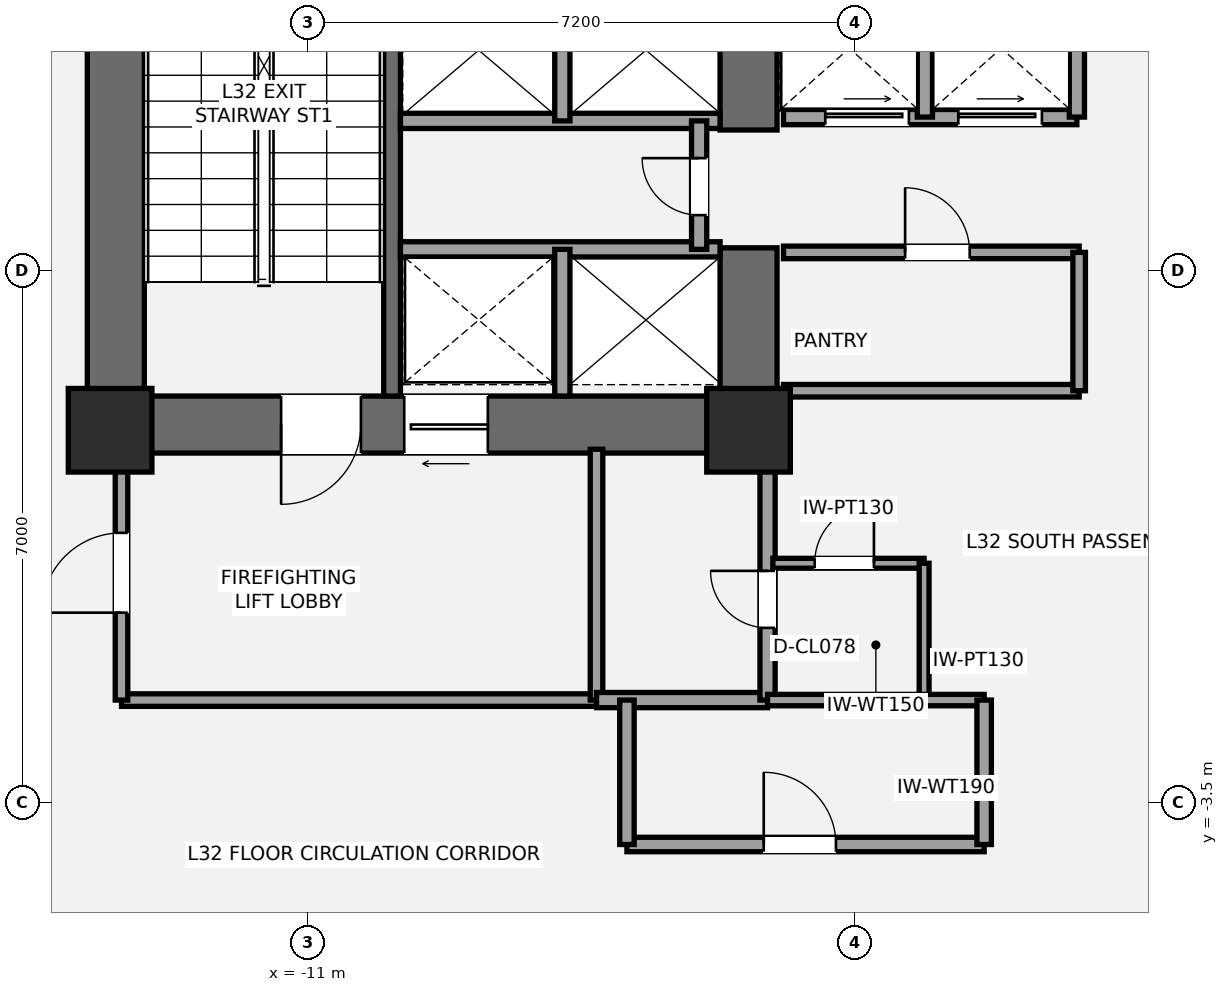
"""IFC4 building model, lengths in metres.
Left out: names, types, materials, properties, quantities, classifications, styles, units other than length and angle.
Written with IfcOpenShell. Run it as: python <this file> out.ifc"""

import sys

from ifc_helpers import new_model, si_unit, direction, frame, frame_2d, origin, origin_2d, place, context, subcontext, project, spatial, rectangle, extrude, element, fill, save


model = new_model("IFC4")
c1 = context("Model", 3, precision=1e-05, world=origin(), true_north=direction((0.0, 1.0)))
c2 = subcontext(c1, "Body", "Model", "MODEL_VIEW")
j1 = project(units=[si_unit("LENGTHUNIT", "METRE"), si_unit("PLANEANGLEUNIT", "RADIAN")], contexts=[c1])
p1 = place(None, origin())
s1 = spatial("IfcSite", under=j1, at=p1, CompositionType="ELEMENT")
p2 = place(p1, origin())
s2 = spatial("IfcBuilding", under=s1, at=p2, CompositionType="ELEMENT")
p3 = place(p2, frame((0.0, 0.0, 121.1)))
s3 = spatial("IfcBuildingStorey", under=s2, at=p3, CompositionType="ELEMENT", Elevation=121.1)
p4 = place(p3, frame((-13.525, 1.1, 0.0), z_axis=(0.0, 0.0, 1.0), x_axis=(0.0, 1.0, 0.0)))
e1 = element("IfcWall", 1, at=p4, inside=s3, PredefinedType="SHEAR", context=c2, shape_type="SweptSolid", body=[
    extrude(rectangle(XDim=8.65, YDim=0.75, at=frame_2d((4.325, 0.0))), origin(), (0.0, 0.0, 1.0), 3.5),
])
p5 = place(p3, frame((-4.825, 1.475, 0.0), z_axis=(0.0, 0.0, 1.0), x_axis=(-1.0, 0.0, 0.0)))
e2 = element("IfcWall", 2, at=p5, inside=s3, PredefinedType="SHEAR", context=c2, shape_type="SweptSolid", body=[
    extrude(rectangle(XDim=9.075, YDim=0.75, at=frame_2d((4.538, 0.0))), origin(), (0.0, 0.0, 1.0), 3.5),
])
p6 = place(p5, frame((5.475, 0.0, 0.0)))
e3 = element("IfcOpeningElement", 3, at=p6, cuts=e2, PredefinedType="OPENING", context=c2, shape_type="SweptSolid", body=[
    extrude(rectangle(XDim=1.05, YDim=2.15, at=frame_2d((0.525, 1.075))), frame((0.0, 0.385, 0.0), z_axis=(0.0, -1.0, 0.0), x_axis=(1.0, 0.0, 0.0)), (0.0, 0.0, 1.0), 0.77),
])
p7 = place(p5, frame((3.805, 0.0, 0.0)))
e4 = element("IfcOpeningElement", 4, at=p7, cuts=e2, PredefinedType="OPENING", context=c2, shape_type="SweptSolid", body=[
    extrude(rectangle(XDim=1.1, YDim=2.2, at=frame_2d((0.55, 1.1))), frame((0.0, 0.385, 0.0), z_axis=(0.0, -1.0, 0.0), x_axis=(1.0, 0.0, 0.0)), (0.0, 0.0, 1.0), 0.77),
])
p8 = place(p3, frame((-5.2, 1.1, 0.0), z_axis=(0.0, 0.0, 1.0), x_axis=(0.0, 1.0, 0.0)))
e5 = element("IfcWall", 5, at=p8, inside=s3, PredefinedType="SHEAR", context=c2, shape_type="SweptSolid", body=[
    extrude(rectangle(XDim=2.7, YDim=0.75, at=frame_2d((1.35, 0.0))), origin(), (0.0, 0.0, 1.0), 3.5),
])
p9 = place(p3, frame((-5.2, 5.35, 0.0), z_axis=(0.0, 0.0, 1.0), x_axis=(0.0, 1.0, 0.0)))
e6 = element("IfcWall", 6, at=p9, inside=s3, PredefinedType="SHEAR", context=c2, shape_type="SweptSolid", body=[
    extrude(rectangle(XDim=2.0, YDim=0.75, at=frame_2d((1.0, 0.0))), origin(), (0.0, 0.0, 1.0), 3.5),
])
p10 = place(p3, frame((-9.89, 1.85, 0.0), z_axis=(0.0, 0.0, 1.0), x_axis=(0.0, 1.0, 0.0)))
e7 = element("IfcWall", 7, at=p10, inside=s3, PredefinedType="SHEAR", context=c2, shape_type="SweptSolid", body=[
    extrude(rectangle(XDim=7.15, YDim=0.22, at=frame_2d((3.575, 0.0))), origin(), (0.0, 0.0, 1.0), 3.5),
])
for number, where, z_axis, x_axis in (
    (8, (-13.6, 1.4, 0.0), (0.0, 0.0, 1.0), (1.0, 0.0, 0.0)),
    (9, (-5.2, 1.4, 0.0), (0.0, 0.0, 1.0), (1.0, 0.0, 0.0)),
):
    element("IfcColumn", number, at=place(p3, frame(where, z_axis=z_axis, x_axis=x_axis)), inside=s3, PredefinedType="COLUMN", context=c2, shape_type="SweptSolid", body=[
        extrude(rectangle(XDim=1.1, YDim=1.1, at=origin_2d()), origin(), (0.0, 0.0, 1.0), 3.5),
    ])
p11 = place(p3, frame((-13.45, -2.15, 0.0), z_axis=(0.0, 0.0, 1.0), x_axis=(1.0, 0.0, 0.0)))
e10 = element("IfcWall", 10, at=p11, inside=s3, PredefinedType="PARTITIONING", context=c2, shape_type="SweptSolid", body=[
    extrude(rectangle(XDim=6.25, YDim=0.165, at=frame_2d((3.125, 0.0))), origin(), (0.0, 0.0, 1.0), 3.31),
])
p12 = place(p3, frame((-13.45, -2.15, 0.0), z_axis=(0.0, 0.0, 1.0), x_axis=(0.0, 1.0, 0.0)))
e11 = element("IfcWall", 11, at=p12, inside=s3, PredefinedType="PARTITIONING", context=c2, shape_type="SweptSolid", body=[
    extrude(rectangle(XDim=3.3, YDim=0.165, at=frame_2d((1.65, 0.0))), origin(), (0.0, 0.0, 1.0), 2.763),
])
p13 = place(p12, frame((1.15, 0.0, 0.0)))
e12 = element("IfcOpeningElement", 12, at=p13, cuts=e11, PredefinedType="OPENING", context=c2, shape_type="SweptSolid", body=[
    extrude(rectangle(XDim=1.05, YDim=2.15, at=frame_2d((0.525, 1.075))), frame((0.0, 0.093, 0.0), z_axis=(0.0, -1.0, 0.0), x_axis=(1.0, 0.0, 0.0)), (0.0, 0.0, 1.0), 0.185),
])
p14 = place(p3, frame((-7.2, -2.15, 0.0), z_axis=(0.0, 0.0, 1.0), x_axis=(0.0, 1.0, 0.0)))
e13 = element("IfcWall", 13, at=p14, inside=s3, PredefinedType="PARTITIONING", context=c2, shape_type="SweptSolid", body=[
    extrude(rectangle(XDim=3.3, YDim=0.165, at=frame_2d((1.65, 0.0))), origin(), (0.0, 0.0, 1.0), 2.763),
])
p15 = place(p3, frame((-7.2, -2.15, 0.0), z_axis=(0.0, 0.0, 1.0), x_axis=(1.0, 0.0, 0.0)))
e14 = element("IfcWall", 14, at=p15, inside=s3, PredefinedType="SOLIDWALL", context=c2, shape_type="SweptSolid", body=[
    extrude(rectangle(XDim=2.25, YDim=0.2, at=frame_2d((1.125, 0.0))), origin(), (0.0, 0.0, 1.0), 2.763),
])
p16 = place(p3, frame((-4.95, -2.15, 0.0), z_axis=(0.0, 0.0, 1.0), x_axis=(0.0, 1.0, 0.0)))
e15 = element("IfcWall", 15, at=p16, inside=s3, PredefinedType="SOLIDWALL", context=c2, shape_type="SweptSolid", body=[
    extrude(rectangle(XDim=3.3, YDim=0.2, at=frame_2d((1.65, 0.0))), origin(), (0.0, 0.0, 1.0), 2.763),
])
p17 = place(p16, frame((0.95, 0.0, 0.0)))
e16 = element("IfcOpeningElement", 16, at=p17, cuts=e15, PredefinedType="OPENING", context=c2, shape_type="SweptSolid", body=[
    extrude(rectangle(XDim=0.75, YDim=2.1, at=frame_2d((0.375, 1.05))), frame((0.0, 0.11, 0.0), z_axis=(0.0, -1.0, 0.0), x_axis=(1.0, 0.0, 0.0)), (0.0, 0.0, 1.0), 0.22),
])
p18 = place(p3, frame((-4.88, -0.35, 0.0), z_axis=(0.0, 0.0, 1.0), x_axis=(1.0, 0.0, 0.0)))
e17 = element("IfcWall", 17, at=p18, inside=s3, PredefinedType="PARTITIONING", context=c2, shape_type="SweptSolid", body=[
    extrude(rectangle(XDim=1.99, YDim=0.13, at=frame_2d((0.995, 0.0))), origin(), (0.0, 0.0, 1.0), 3.31),
])
p19 = place(p18, frame((0.55, 0.0, 0.0)))
e18 = element("IfcOpeningElement", 18, at=p19, cuts=e17, PredefinedType="OPENING", context=c2, shape_type="SweptSolid", body=[
    extrude(rectangle(XDim=0.78, YDim=2.1, at=frame_2d((0.39, 1.05))), frame((0.0, 0.075, 0.0), z_axis=(0.0, -1.0, 0.0), x_axis=(1.0, 0.0, 0.0)), (0.0, 0.0, 1.0), 0.15),
])
p20 = place(p3, frame((-2.89, -2.15, 0.0), z_axis=(0.0, 0.0, 1.0), x_axis=(0.0, 1.0, 0.0)))
e19 = element("IfcWall", 19, at=p20, inside=s3, PredefinedType="PARTITIONING", context=c2, shape_type="SweptSolid", body=[
    extrude(rectangle(XDim=1.8, YDim=0.13, at=frame_2d((0.9, 0.0))), origin(), (0.0, 0.0, 1.0), 2.763),
])
p21 = place(p3, frame((-9.78, 3.78, 0.0), z_axis=(0.0, 0.0, 1.0), x_axis=(1.0, 0.0, 0.0)))
e20 = element("IfcWall", 20, at=p21, inside=s3, PredefinedType="SOLIDWALL", context=c2, shape_type="SweptSolid", body=[
    extrude(rectangle(XDim=4.205, YDim=0.2, at=frame_2d((2.103, 0.0))), origin(), (0.0, 0.0, 1.0), 3.31),
])
p22 = place(p3, frame((-7.65, 1.85, 0.0), z_axis=(0.0, 0.0, 1.0), x_axis=(0.0, 1.0, 0.0)))
e21 = element("IfcWall", 21, at=p22, inside=s3, PredefinedType="SOLIDWALL", context=c2, shape_type="SweptSolid", body=[
    extrude(rectangle(XDim=1.93, YDim=0.2, at=frame_2d((0.965, 0.0))), origin(), (0.0, 0.0, 1.0), 3.31),
])
p23 = place(p3, frame((-9.78, 5.47, 0.0), z_axis=(0.0, 0.0, 1.0), x_axis=(1.0, 0.0, 0.0)))
e22 = element("IfcWall", 22, at=p23, inside=s3, PredefinedType="SOLIDWALL", context=c2, shape_type="SweptSolid", body=[
    extrude(rectangle(XDim=4.205, YDim=0.2, at=frame_2d((2.103, 0.0))), origin(), (0.0, 0.0, 1.0), 3.31),
])
p24 = place(p3, frame((-7.65, 5.47, 0.0), z_axis=(0.0, 0.0, 1.0), x_axis=(0.0, 1.0, 0.0)))
e23 = element("IfcWall", 23, at=p24, inside=s3, PredefinedType="SOLIDWALL", context=c2, shape_type="SweptSolid", body=[
    extrude(rectangle(XDim=1.86, YDim=0.2, at=frame_2d((0.93, 0.0))), origin(), (0.0, 0.0, 1.0), 3.31),
])
p25 = place(p3, frame((-5.85, 3.78, 0.0), z_axis=(0.0, 0.0, 1.0), x_axis=(0.0, 1.0, 0.0)))
e24 = element("IfcWall", 24, at=p25, inside=s3, PredefinedType="SOLIDWALL", context=c2, shape_type="SweptSolid", body=[
    extrude(rectangle(XDim=1.69, YDim=0.2, at=frame_2d((0.845, 0.0))), origin(), (0.0, 0.0, 1.0), 3.31),
])
p26 = place(p25, frame((0.45, 0.0, 0.0)))
e25 = element("IfcOpeningElement", 25, at=p26, cuts=e24, PredefinedType="OPENING", context=c2, shape_type="SweptSolid", body=[
    extrude(rectangle(XDim=0.75, YDim=2.1, at=frame_2d((0.375, 1.05))), frame((0.0, 0.11, 0.0), z_axis=(0.0, -1.0, 0.0), x_axis=(1.0, 0.0, 0.0)), (0.0, 0.0, 1.0), 0.22),
])
p27 = place(p3, frame((-4.74, 1.92, 0.0), z_axis=(0.0, 0.0, 1.0), x_axis=(1.0, 0.0, 0.0)))
e26 = element("IfcWall", 26, at=p27, inside=s3, PredefinedType="PARTITIONING", context=c2, shape_type="SweptSolid", body=[
    extrude(rectangle(XDim=3.89, YDim=0.165, at=frame_2d((1.945, 0.0))), origin(), (0.0, 0.0, 1.0), 2.3),
])
p28 = place(p3, frame((-4.74, 3.74, 0.0), z_axis=(0.0, 0.0, 1.0), x_axis=(1.0, 0.0, 0.0)))
e27 = element("IfcWall", 27, at=p28, inside=s3, PredefinedType="PARTITIONING", context=c2, shape_type="SweptSolid", body=[
    extrude(rectangle(XDim=3.89, YDim=0.165, at=frame_2d((1.945, 0.0))), origin(), (0.0, 0.0, 1.0), 3.31),
])
p29 = place(p28, frame((1.6, 0.0, 0.0)))
e28 = element("IfcOpeningElement", 28, at=p29, cuts=e27, PredefinedType="OPENING", context=c2, shape_type="SweptSolid", body=[
    extrude(rectangle(XDim=0.85, YDim=2.1, at=frame_2d((0.425, 1.05))), frame((0.0, 0.093, 0.0), z_axis=(0.0, -1.0, 0.0), x_axis=(1.0, 0.0, 0.0)), (0.0, 0.0, 1.0), 0.185),
])
p30 = place(p3, frame((-0.85, 1.92, 0.0), z_axis=(0.0, 0.0, 1.0), x_axis=(0.0, 1.0, 0.0)))
e29 = element("IfcWall", 29, at=p30, inside=s3, PredefinedType="PARTITIONING", context=c2, shape_type="SweptSolid", body=[
    extrude(rectangle(XDim=1.82, YDim=0.165, at=frame_2d((0.91, 0.0))), origin(), (0.0, 0.0, 1.0), 3.31),
])
p31 = place(p3, frame((-4.74, 5.52, 0.0), z_axis=(0.0, 0.0, 1.0), x_axis=(1.0, 0.0, 0.0)))
e30 = element("IfcWall", 30, at=p31, inside=s3, PredefinedType="SOLIDWALL", context=c2, shape_type="SweptSolid", body=[
    extrude(rectangle(XDim=3.86, YDim=0.2, at=frame_2d((1.93, 0.0))), origin(), (0.0, 0.0, 1.0), 3.31),
])
p32 = place(p31, frame((0.55, 0.0, 0.0)))
e31 = element("IfcOpeningElement", 31, at=p32, cuts=e30, PredefinedType="OPENING", context=c2, shape_type="SweptSolid", body=[
    extrude(rectangle(XDim=1.1, YDim=2.2, at=frame_2d((0.55, 1.1))), frame((0.0, 0.11, 0.0), z_axis=(0.0, -1.0, 0.0), x_axis=(1.0, 0.0, 0.0)), (0.0, 0.0, 1.0), 0.22),
])
p33 = place(p31, frame((2.3, 0.0, 0.0)))
e32 = element("IfcOpeningElement", 32, at=p33, cuts=e30, PredefinedType="OPENING", context=c2, shape_type="SweptSolid", body=[
    extrude(rectangle(XDim=1.1, YDim=2.2, at=frame_2d((0.55, 1.1))), frame((0.0, 0.11, 0.0), z_axis=(0.0, -1.0, 0.0), x_axis=(1.0, 0.0, 0.0)), (0.0, 0.0, 1.0), 0.22),
])
for number, where, z_axis, x_axis in (
    (33, (-2.88, 5.52, 0.0), (0.0, 0.0, 1.0), (0.0, 1.0, 0.0)),
    (34, (-0.88, 5.52, 0.0), (0.0, 0.0, 1.0), (0.0, 1.0, 0.0)),
):
    element("IfcWall", number, at=place(p3, frame(where, z_axis=z_axis, x_axis=x_axis)), inside=s3, PredefinedType="SOLIDWALL", context=c2, shape_type="SweptSolid", body=[
        extrude(rectangle(XDim=1.81, YDim=0.2, at=frame_2d((0.905, 0.0))), origin(), (0.0, 0.0, 1.0), 3.31),
    ])
p34 = place(p3, frame((-6.8, -4.05, 0.0), z_axis=(0.0, 0.0, 1.0), x_axis=(1.0, 0.0, 0.0)))
e35 = element("IfcWall", 35, at=p34, inside=s3, PredefinedType="PLUMBINGWALL", context=c2, shape_type="SweptSolid", body=[
    extrude(rectangle(XDim=4.7, YDim=0.19, at=frame_2d((2.35, 0.0))), origin(), (0.0, 0.0, 1.0), 2.763),
])
p35 = place(p34, frame((1.8, 0.0, 0.0)))
e36 = element("IfcOpeningElement", 36, at=p35, cuts=e35, PredefinedType="OPENING", context=c2, shape_type="SweptSolid", body=[
    extrude(rectangle(XDim=0.95, YDim=2.15, at=frame_2d((0.475, 1.075))), frame((0.0, 0.105, 0.0), z_axis=(0.0, -1.0, 0.0), x_axis=(1.0, 0.0, 0.0)), (0.0, 0.0, 1.0), 0.21),
])
p36 = place(p3, frame((-4.95, -2.15, 0.0), z_axis=(0.0, 0.0, 1.0), x_axis=(1.0, 0.0, 0.0)))
e37 = element("IfcWall", 37, at=p36, inside=s3, PredefinedType="PLUMBINGWALL", context=c2, shape_type="SweptSolid", body=[
    extrude(rectangle(XDim=2.85, YDim=0.15, at=frame_2d((1.425, 0.0))), origin(), (0.0, 0.0, 1.0), 2.763),
])
for number, where, z_axis, x_axis in (
    (38, (-6.8, -4.05, 0.0), (0.0, 0.0, 1.0), (0.0, 1.0, 0.0)),
    (39, (-2.1, -4.05, 0.0), (0.0, 0.0, 1.0), (0.0, 1.0, 0.0)),
):
    element("IfcWall", number, at=place(p3, frame(where, z_axis=z_axis, x_axis=x_axis)), inside=s3, PredefinedType="PLUMBINGWALL", context=c2, shape_type="SweptSolid", body=[
        extrude(rectangle(XDim=1.9, YDim=0.19, at=frame_2d((0.95, 0.0))), origin(), (0.0, 0.0, 1.0), 2.763),
    ])
p37 = place(p6, origin())
e40 = element("IfcDoor", 40, at=p37, inside=s3, OperationType="SINGLE_SWING_RIGHT", PredefinedType="DOOR", context=c2, shape_type="SweptSolid", body=[
    extrude(rectangle(XDim=1.05, YDim=2.15, at=frame_2d((0.525, 1.075))), frame((0.0, 0.025, 0.0), z_axis=(0.0, -1.0, 0.0), x_axis=(1.0, 0.0, 0.0)), (0.0, 0.0, 1.0), 0.05),
])
fill(e3, e40)
p38 = place(p13, origin())
e41 = element("IfcDoor", 41, at=p38, inside=s3, OperationType="SINGLE_SWING_LEFT", PredefinedType="DOOR", context=c2, shape_type="SweptSolid", body=[
    extrude(rectangle(XDim=1.05, YDim=2.15, at=frame_2d((0.525, 1.075))), frame((0.0, 0.025, 0.0), z_axis=(0.0, -1.0, 0.0), x_axis=(1.0, 0.0, 0.0)), (0.0, 0.0, 1.0), 0.05),
])
fill(e12, e41)
p39 = place(p17, origin())
e42 = element("IfcDoor", 42, at=p39, inside=s3, OperationType="SINGLE_SWING_RIGHT", PredefinedType="DOOR", context=c2, shape_type="SweptSolid", body=[
    extrude(rectangle(XDim=0.75, YDim=2.1, at=frame_2d((0.375, 1.05))), frame((0.0, 0.025, 0.0), z_axis=(0.0, -1.0, 0.0), x_axis=(1.0, 0.0, 0.0)), (0.0, 0.0, 1.0), 0.05),
])
fill(e16, e42)
p40 = place(p19, origin())
e43 = element("IfcDoor", 43, at=p40, inside=s3, OperationType="SINGLE_SWING_RIGHT", PredefinedType="DOOR", context=c2, shape_type="SweptSolid", body=[
    extrude(rectangle(XDim=0.78, YDim=2.1, at=frame_2d((0.39, 1.05))), frame((0.0, 0.025, 0.0), z_axis=(0.0, -1.0, 0.0), x_axis=(1.0, 0.0, 0.0)), (0.0, 0.0, 1.0), 0.05),
])
fill(e18, e43)
p41 = place(p7, origin())
e44 = element("IfcDoor", 44, at=p41, inside=s3, OperationType="SLIDING_TO_LEFT", PredefinedType="DOOR", context=c2, shape_type="SweptSolid", body=[
    extrude(rectangle(XDim=1.1, YDim=2.2, at=frame_2d((0.55, 1.1))), frame((0.0, 0.025, 0.0), z_axis=(0.0, -1.0, 0.0), x_axis=(1.0, 0.0, 0.0)), (0.0, 0.0, 1.0), 0.05),
])
fill(e4, e44)
p42 = place(p26, origin())
e45 = element("IfcDoor", 45, at=p42, inside=s3, OperationType="SINGLE_SWING_RIGHT", PredefinedType="DOOR", context=c2, shape_type="SweptSolid", body=[
    extrude(rectangle(XDim=0.75, YDim=2.1, at=frame_2d((0.375, 1.05))), frame((0.0, 0.025, 0.0), z_axis=(0.0, -1.0, 0.0), x_axis=(1.0, 0.0, 0.0)), (0.0, 0.0, 1.0), 0.05),
])
fill(e25, e45)
p43 = place(p29, origin())
e46 = element("IfcDoor", 46, at=p43, inside=s3, OperationType="SINGLE_SWING_LEFT", PredefinedType="DOOR", context=c2, shape_type="SweptSolid", body=[
    extrude(rectangle(XDim=0.85, YDim=2.1, at=frame_2d((0.425, 1.05))), frame((0.0, 0.025, 0.0), z_axis=(0.0, -1.0, 0.0), x_axis=(1.0, 0.0, 0.0)), (0.0, 0.0, 1.0), 0.05),
])
fill(e28, e46)
p44 = place(p32, origin())
e47 = element("IfcDoor", 47, at=p44, inside=s3, OperationType="SLIDING_TO_LEFT", PredefinedType="DOOR", context=c2, shape_type="SweptSolid", body=[
    extrude(rectangle(XDim=1.1, YDim=2.2, at=frame_2d((0.55, 1.1))), frame((0.0, 0.025, 0.0), z_axis=(0.0, -1.0, 0.0), x_axis=(1.0, 0.0, 0.0)), (0.0, 0.0, 1.0), 0.05),
])
fill(e31, e47)
p45 = place(p33, origin())
e48 = element("IfcDoor", 48, at=p45, inside=s3, OperationType="SLIDING_TO_LEFT", PredefinedType="DOOR", context=c2, shape_type="SweptSolid", body=[
    extrude(rectangle(XDim=1.1, YDim=2.2, at=frame_2d((0.55, 1.1))), frame((0.0, 0.025, 0.0), z_axis=(0.0, -1.0, 0.0), x_axis=(1.0, 0.0, 0.0)), (0.0, 0.0, 1.0), 0.05),
])
fill(e32, e48)
p46 = place(p35, origin())
e49 = element("IfcDoor", 49, at=p46, inside=s3, OperationType="SINGLE_SWING_LEFT", PredefinedType="DOOR", context=c2, shape_type="SweptSolid", body=[
    extrude(rectangle(XDim=0.95, YDim=2.15, at=frame_2d((0.475, 1.075))), frame((0.0, 0.025, 0.0), z_axis=(0.0, -1.0, 0.0), x_axis=(1.0, 0.0, 0.0)), (0.0, 0.0, 1.0), 0.05),
])
fill(e36, e49)
save(model, sys.argv[1])
